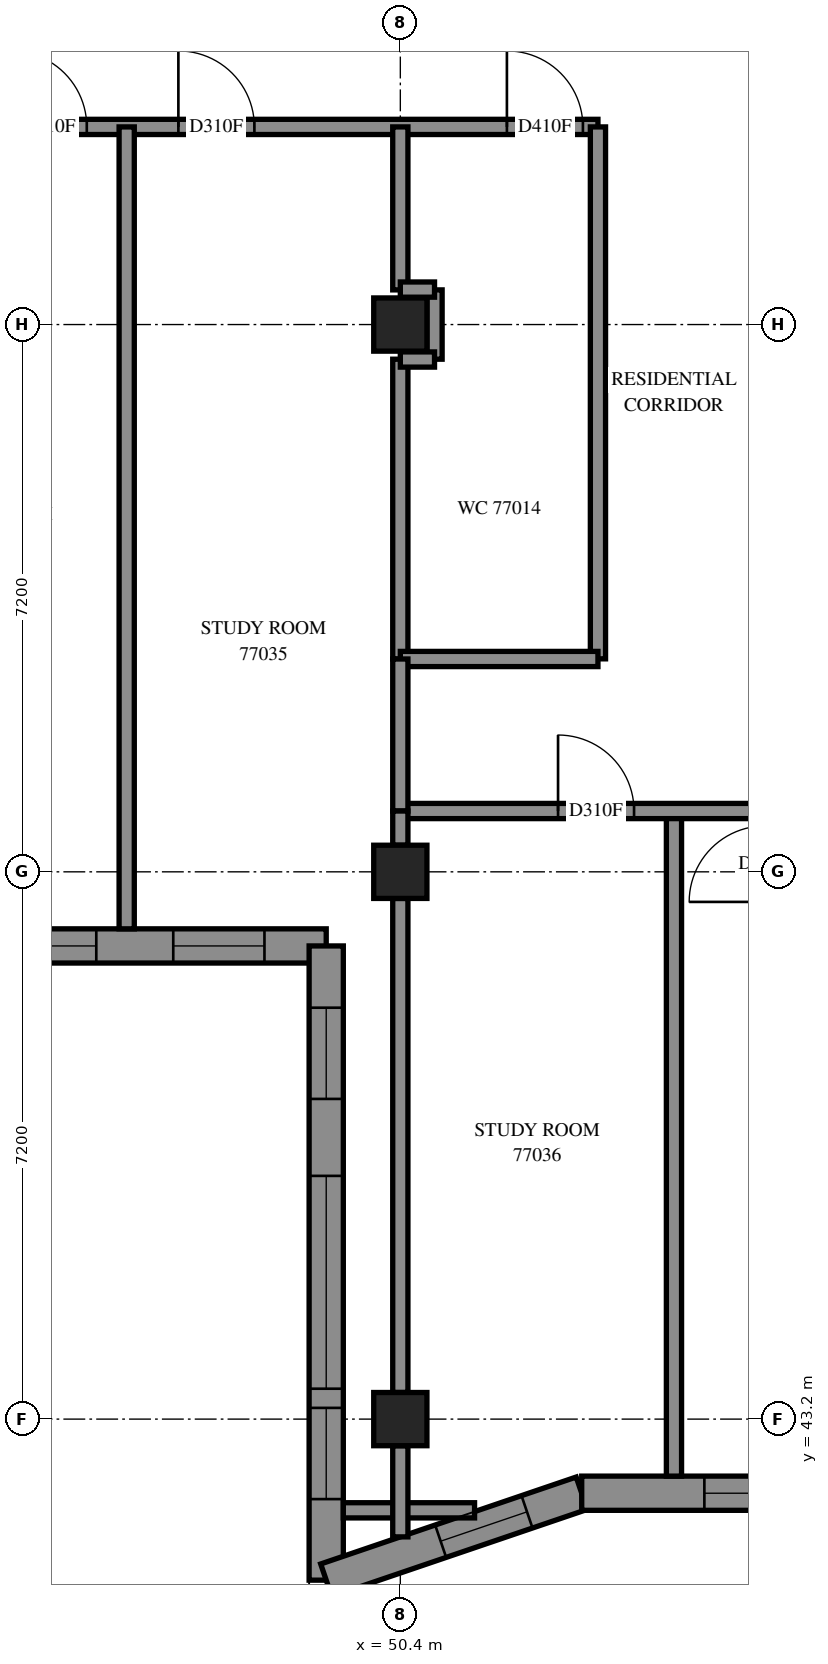
"""IFC4 building model, lengths in metres.
Left out: names, types, materials, properties, quantities, classifications, styles, units other than length and angle.
Written with IfcOpenShell. Run it as: python <this file> out.ifc"""

import sys

from ifc_helpers import new_model, si_unit, direction, frame, frame_2d, origin, origin_2d, place, context, subcontext, project, spatial, polyline, rectangle, outline, extrude, element, fill, save


model = new_model("IFC4")
c1 = context("Model", 3, precision=1e-05, world=origin(), true_north=direction((0.0, 1.0)))
c2 = subcontext(c1, "Body", "Model", "MODEL_VIEW")
j1 = project(units=[si_unit("LENGTHUNIT", "METRE"), si_unit("PLANEANGLEUNIT", "RADIAN")], contexts=[c1])
p1 = place(None, origin())
s1 = spatial("IfcSite", under=j1, at=p1, CompositionType="ELEMENT")
p2 = place(p1, origin())
s2 = spatial("IfcBuilding", under=s1, at=p2, CompositionType="ELEMENT")
p3 = place(p2, frame((0.0, 0.0, 281.2)))
s3 = spatial("IfcBuildingStorey", under=s2, at=p3, CompositionType="ELEMENT", Elevation=281.2)
for number, where, z_axis, x_axis in (
    (1, (50.4, 43.2, 0.0), (0.0, 0.0, 1.0), (1.0, 0.0, 0.0)),
    (2, (50.4, 50.4, 0.0), (0.0, 0.0, 1.0), (1.0, 0.0, 0.0)),
    (3, (50.4, 57.6, 0.0), (0.0, 0.0, 1.0), (1.0, 0.0, 0.0)),
):
    element("IfcColumn", number, at=place(p3, frame(where, z_axis=z_axis, x_axis=x_axis)), inside=s3, PredefinedType="COLUMN", context=c2, shape_type="SweptSolid", body=[
        extrude(rectangle(XDim=0.7, YDim=0.7, at=origin_2d()), origin(), (0.0, 0.0, 1.0), 3.1),
    ])
p4 = place(p3, frame((42.225, 49.425, 0.0), z_axis=(0.0, 0.0, 1.0), x_axis=(1.0, 0.0, 0.0)))
e4 = element("IfcWall", 4, at=p4, inside=s3, PredefinedType="SOLIDWALL", context=c2, shape_type="SweptSolid", body=[
    extrude(outline(polyline([(-0.225, -0.225), (6.975, -0.225), (7.425, 0.225), (0.225, 0.225), (-0.225, -0.225)])), origin(), (0.0, 0.0, 1.0), 3.1),
])
p5 = place(p4, frame((1.375, 0.0, 0.45)))
e5 = element("IfcOpeningElement", 5, at=p5, cuts=e4, PredefinedType="OPENING", context=c2, shape_type="SweptSolid", body=[
    extrude(rectangle(XDim=2.8, YDim=2.55, at=frame_2d((1.4, 1.275))), frame((0.0, 0.235, 0.0), z_axis=(0.0, -1.0, 0.0), x_axis=(1.0, 0.0, 0.0)), (0.0, 0.0, 1.0), 0.47),
])
p6 = place(p4, frame((5.188, 0.0, 0.45)))
e6 = element("IfcOpeningElement", 6, at=p6, cuts=e4, PredefinedType="OPENING", context=c2, shape_type="SweptSolid", body=[
    extrude(rectangle(XDim=1.2, YDim=2.55, at=frame_2d((0.6, 1.275))), frame((0.0, 0.235, 0.0), z_axis=(0.0, -1.0, 0.0), x_axis=(1.0, 0.0, 0.0)), (0.0, 0.0, 1.0), 0.47),
])
p7 = place(p3, frame((49.425, 49.425, 0.0), z_axis=(0.0, 0.0, 1.0), x_axis=(0.0, -1.0, 0.0)))
e7 = element("IfcWall", 7, at=p7, inside=s3, PredefinedType="SOLIDWALL", context=c2, shape_type="SweptSolid", body=[
    extrude(outline(polyline([(0.225, -0.225), (8.658, -0.225), (8.03, 0.225), (-0.225, 0.225), (0.225, -0.225)])), origin(), (0.0, 0.0, 1.0), 3.1),
])
p8 = place(p7, frame((3.025, 0.0, 0.45)))
e8 = element("IfcOpeningElement", 8, at=p8, cuts=e7, PredefinedType="OPENING", context=c2, shape_type="SweptSolid", body=[
    extrude(rectangle(XDim=2.8, YDim=2.55, at=frame_2d((1.4, 1.275))), frame((0.0, 0.235, 0.0), z_axis=(0.0, -1.0, 0.0), x_axis=(1.0, 0.0, 0.0)), (0.0, 0.0, 1.0), 0.47),
])
p9 = place(p7, frame((0.812, 0.0, 0.45)))
e9 = element("IfcOpeningElement", 9, at=p9, cuts=e7, PredefinedType="OPENING", context=c2, shape_type="SweptSolid", body=[
    extrude(rectangle(XDim=1.2, YDim=2.55, at=frame_2d((0.6, 1.275))), frame((0.0, 0.235, 0.0), z_axis=(0.0, -1.0, 0.0), x_axis=(1.0, 0.0, 0.0)), (0.0, 0.0, 1.0), 0.47),
])
p10 = place(p7, frame((6.077, 0.0, 0.45)))
e10 = element("IfcOpeningElement", 10, at=p10, cuts=e7, PredefinedType="OPENING", context=c2, shape_type="SweptSolid", body=[
    extrude(rectangle(XDim=1.2, YDim=2.55, at=frame_2d((0.6, 1.275))), frame((0.0, 0.235, 0.0), z_axis=(0.0, -1.0, 0.0), x_axis=(1.0, 0.0, 0.0)), (0.0, 0.0, 1.0), 0.47),
])
p11 = place(p3, frame((49.425, 41.081, 0.0), z_axis=(0.0, 0.0, 1.0), x_axis=(0.9466934054, 0.3221359901, 0.0)))
e11 = element("IfcWall", 11, at=p11, inside=s3, PredefinedType="SOLIDWALL", context=c2, shape_type="SweptSolid", body=[
    extrude(outline(polyline([(-0.314, -0.225), (3.513, -0.225), (3.588, 0.225), (0.314, 0.225), (-0.314, -0.225)])), origin(), (0.0, 0.0, 1.0), 3.1),
])
p12 = place(p11, frame((1.59, 0.0, 0.45)))
e12 = element("IfcOpeningElement", 12, at=p12, cuts=e11, PredefinedType="OPENING", context=c2, shape_type="SweptSolid", body=[
    extrude(rectangle(XDim=1.2, YDim=2.55, at=frame_2d((0.6, 1.275))), frame((0.0, 0.235, 0.0), z_axis=(0.0, -1.0, 0.0), x_axis=(1.0, 0.0, 0.0)), (0.0, 0.0, 1.0), 0.47),
])
p13 = place(p3, frame((52.786, 42.225, 0.0), z_axis=(0.0, 0.0, 1.0), x_axis=(1.0, 0.0, 0.0)))
e13 = element("IfcWall", 13, at=p13, inside=s3, PredefinedType="SOLIDWALL", context=c2, shape_type="SweptSolid", body=[
    extrude(outline(polyline([(0.037, -0.225), (7.285, -0.225), (7.285, 0.225), (-0.037, 0.225), (0.037, -0.225)])), origin(), (0.0, 0.0, 1.0), 3.1),
])
p14 = place(p13, frame((1.614, 0.0, 0.45)))
e14 = element("IfcOpeningElement", 14, at=p14, cuts=e13, PredefinedType="OPENING", context=c2, shape_type="SweptSolid", body=[
    extrude(rectangle(XDim=2.8, YDim=2.55, at=frame_2d((1.4, 1.275))), frame((0.0, 0.235, 0.0), z_axis=(0.0, -1.0, 0.0), x_axis=(1.0, 0.0, 0.0)), (0.0, 0.0, 1.0), 0.47),
])
p15 = place(p13, frame((5.349, 0.0, 0.45)))
e15 = element("IfcOpeningElement", 15, at=p15, cuts=e13, PredefinedType="OPENING", context=c2, shape_type="SweptSolid", body=[
    extrude(rectangle(XDim=1.2, YDim=2.55, at=frame_2d((0.6, 1.275))), frame((0.0, 0.235, 0.0), z_axis=(0.0, -1.0, 0.0), x_axis=(1.0, 0.0, 0.0)), (0.0, 0.0, 1.0), 0.47),
])
p16 = place(p3, frame((36.0, 60.2, 0.0), z_axis=(0.0, 0.0, 1.0), x_axis=(1.0, 0.0, 0.0)))
e16 = element("IfcWall", 16, at=p16, inside=s3, PredefinedType="PARTITIONING", context=c2, shape_type="SweptSolid", body=[
    extrude(rectangle(XDim=17.0, YDim=0.2, at=frame_2d((8.5, 0.0))), origin(), (0.0, 0.0, 1.0), 3.1),
])
p17 = place(p16, frame((15.802, 0.0, 0.0)))
e17 = element("IfcOpeningElement", 17, at=p17, cuts=e16, PredefinedType="OPENING", context=c2, shape_type="SweptSolid", body=[
    extrude(rectangle(XDim=1.0, YDim=2.1, at=frame_2d((0.5, 1.05))), frame((0.0, 0.11, 0.0), z_axis=(0.0, -1.0, 0.0), x_axis=(1.0, 0.0, 0.0)), (0.0, 0.0, 1.0), 0.22),
])
p18 = place(p16, frame((2.075, 0.0, 0.0)))
e18 = element("IfcOpeningElement", 18, at=p18, cuts=e16, PredefinedType="OPENING", context=c2, shape_type="SweptSolid", body=[
    extrude(rectangle(XDim=1.0, YDim=2.1, at=frame_2d((0.5, 1.05))), frame((0.0, 0.11, 0.0), z_axis=(0.0, -1.0, 0.0), x_axis=(1.0, 0.0, 0.0)), (0.0, 0.0, 1.0), 0.22),
])
p19 = place(p16, frame((4.125, 0.0, 0.0)))
e19 = element("IfcOpeningElement", 19, at=p19, cuts=e16, PredefinedType="OPENING", context=c2, shape_type="SweptSolid", body=[
    extrude(rectangle(XDim=1.0, YDim=2.1, at=frame_2d((0.5, 1.05))), frame((0.0, 0.11, 0.0), z_axis=(0.0, -1.0, 0.0), x_axis=(1.0, 0.0, 0.0)), (0.0, 0.0, 1.0), 0.22),
])
p20 = place(p16, frame((9.275, 0.0, 0.0)))
e20 = element("IfcOpeningElement", 20, at=p20, cuts=e16, PredefinedType="OPENING", context=c2, shape_type="SweptSolid", body=[
    extrude(rectangle(XDim=1.0, YDim=2.1, at=frame_2d((0.5, 1.05))), frame((0.0, 0.11, 0.0), z_axis=(0.0, -1.0, 0.0), x_axis=(1.0, 0.0, 0.0)), (0.0, 0.0, 1.0), 0.22),
])
p21 = place(p16, frame((11.48, 0.0, 0.0)))
e21 = element("IfcOpeningElement", 21, at=p21, cuts=e16, PredefinedType="OPENING", context=c2, shape_type="SweptSolid", body=[
    extrude(rectangle(XDim=1.0, YDim=2.1, at=frame_2d((0.5, 1.05))), frame((0.0, 0.11, 0.0), z_axis=(0.0, -1.0, 0.0), x_axis=(1.0, 0.0, 0.0)), (0.0, 0.0, 1.0), 0.22),
])
p22 = place(p3, frame((46.8, 49.65, 0.0), z_axis=(0.0, 0.0, 1.0), x_axis=(0.0, 1.0, 0.0)))
e22 = element("IfcWall", 22, at=p22, inside=s3, PredefinedType="PARTITIONING", context=c2, shape_type="SweptSolid", body=[
    extrude(rectangle(XDim=10.55, YDim=0.2, at=frame_2d((5.275, 0.0))), origin(), (0.0, 0.0, 1.0), 3.1),
])
p23 = place(p3, frame((54.0, 42.45, 0.0), z_axis=(0.0, 0.0, 1.0), x_axis=(0.0, 1.0, 0.0)))
e23 = element("IfcWall", 23, at=p23, inside=s3, PredefinedType="PARTITIONING", context=c2, shape_type="SweptSolid", body=[
    extrude(rectangle(XDim=8.75, YDim=0.2, at=frame_2d((4.375, 0.0))), origin(), (0.0, 0.0, 1.0), 3.1),
])
p24 = place(p3, frame((53.0, 53.202, 0.0), z_axis=(0.0, 0.0, 1.0), x_axis=(0.0, 1.0, 0.0)))
e24 = element("IfcWall", 24, at=p24, inside=s3, PredefinedType="PARTITIONING", context=c2, shape_type="SweptSolid", body=[
    extrude(rectangle(XDim=6.998, YDim=0.2, at=frame_2d((3.499, 0.0))), origin(), (0.0, 0.0, 1.0), 3.1),
])
p25 = place(p3, frame((50.4, 43.55, 0.0), z_axis=(0.0, 0.0, 1.0), x_axis=(0.0, 1.0, 0.0)))
e25 = element("IfcWall", 25, at=p25, inside=s3, PredefinedType="PARTITIONING", context=c2, shape_type="SweptSolid", body=[
    extrude(rectangle(XDim=6.5, YDim=0.2, at=frame_2d((3.25, 0.0))), origin(), (0.0, 0.0, 1.0), 2.6),
])
p26 = place(p3, frame((50.4, 51.2, 0.0), z_axis=(0.0, 0.0, 1.0), x_axis=(1.0, 0.0, 0.0)))
e26 = element("IfcWall", 26, at=p26, inside=s3, PredefinedType="PARTITIONING", context=c2, shape_type="SweptSolid", body=[
    extrude(rectangle(XDim=4.8, YDim=0.2, at=frame_2d((2.4, 0.0))), origin(), (0.0, 0.0, 1.0), 3.1),
])
p27 = place(p26, frame((2.075, 0.0, 0.0)))
e27 = element("IfcOpeningElement", 27, at=p27, cuts=e26, PredefinedType="OPENING", context=c2, shape_type="SweptSolid", body=[
    extrude(rectangle(XDim=1.0, YDim=2.1, at=frame_2d((0.5, 1.05))), frame((0.0, 0.11, 0.0), z_axis=(0.0, -1.0, 0.0), x_axis=(1.0, 0.0, 0.0)), (0.0, 0.0, 1.0), 0.22),
])
p28 = place(p3, frame((50.4, 53.2, 0.0), z_axis=(0.0, 0.0, 1.0), x_axis=(0.0, 1.0, 0.0)))
e28 = element("IfcWall", 28, at=p28, inside=s3, PredefinedType="PARTITIONING", context=c2, shape_type="SweptSolid", body=[
    extrude(rectangle(XDim=3.944, YDim=0.2, at=frame_2d((1.972, 0.0))), origin(), (0.0, 0.0, 1.0), 3.1),
])
p29 = place(p3, frame((50.4, 53.2, 0.0), z_axis=(0.0, 0.0, 1.0), x_axis=(1.0, 0.0, 0.0)))
e29 = element("IfcWall", 29, at=p29, inside=s3, PredefinedType="PARTITIONING", context=c2, shape_type="SweptSolid", body=[
    extrude(rectangle(XDim=2.6, YDim=0.2, at=frame_2d((1.3, 0.0))), origin(), (0.0, 0.0, 1.0), 3.1),
])
p30 = place(p3, frame((50.4, 58.056, 0.0), z_axis=(0.0, 0.0, 1.0), x_axis=(0.0, 1.0, 0.0)))
e30 = element("IfcWall", 30, at=p30, inside=s3, PredefinedType="PARTITIONING", context=c2, shape_type="SweptSolid", body=[
    extrude(rectangle(XDim=2.144, YDim=0.2, at=frame_2d((1.072, 0.0))), origin(), (0.0, 0.0, 1.0), 3.1),
])
p31 = place(p3, frame((50.4, 51.2, 0.0), z_axis=(0.0, 0.0, 1.0), x_axis=(0.0, 1.0, 0.0)))
e31 = element("IfcWall", 31, at=p31, inside=s3, PredefinedType="PARTITIONING", context=c2, shape_type="SweptSolid", body=[
    extrude(rectangle(XDim=2.0, YDim=0.2, at=frame_2d((1.0, 0.0))), origin(), (0.0, 0.0, 1.0), 3.1),
])
p32 = place(p3, frame((49.65, 42.0, 0.0), z_axis=(0.0, 0.0, 1.0), x_axis=(1.0, 0.0, 0.0)))
e32 = element("IfcWall", 32, at=p32, inside=s3, PredefinedType="PARTITIONING", context=c2, shape_type="SweptSolid", body=[
    extrude(rectangle(XDim=1.727, YDim=0.2, at=frame_2d((0.863, 0.0))), origin(), (0.0, 0.0, 1.0), 3.1),
])
p33 = place(p3, frame((50.85, 57.144, 0.0), z_axis=(0.0, 0.0, 1.0), x_axis=(0.0, 1.0, 0.0)))
e33 = element("IfcWall", 33, at=p33, inside=s3, PredefinedType="PARTITIONING", context=c2, shape_type="SweptSolid", body=[
    extrude(rectangle(XDim=0.912, YDim=0.2, at=frame_2d((0.456, 0.0))), origin(), (0.0, 0.0, 1.0), 3.1),
])
p34 = place(p3, frame((50.4, 41.651, 0.0), z_axis=(0.0, 0.0, 1.0), x_axis=(0.0, 1.0, 0.0)))
e34 = element("IfcWall", 34, at=p34, inside=s3, PredefinedType="PARTITIONING", context=c2, shape_type="SweptSolid", body=[
    extrude(rectangle(XDim=1.199, YDim=0.2, at=frame_2d((0.6, 0.0))), origin(), (0.0, 0.0, 1.0), 3.1),
])
for number, where, z_axis, x_axis in (
    (35, (50.4, 50.75, 0.0), (0.0, 0.0, 1.0), (0.0, 1.0, 0.0)),
    (36, (50.4, 57.14, 0.0), (0.0, 0.0, 1.0), (1.0, 0.0, 0.0)),
    (37, (50.4, 58.06, 0.0), (0.0, 0.0, 1.0), (1.0, 0.0, 0.0)),
):
    element("IfcWall", number, at=place(p3, frame(where, z_axis=z_axis, x_axis=x_axis)), inside=s3, PredefinedType="PARTITIONING", context=c2, shape_type="SweptSolid", body=[
        extrude(rectangle(XDim=0.45, YDim=0.2, at=frame_2d((0.225, 0.0))), origin(), (0.0, 0.0, 1.0), 3.1),
    ])
p35 = place(p5, origin())
e38 = element("IfcWindow", 38, at=p35, inside=s3, PartitioningType="SINGLE_PANEL", PredefinedType="WINDOW", context=c2, shape_type="SweptSolid", body=[
    extrude(rectangle(XDim=2.8, YDim=2.55, at=frame_2d((1.4, 1.275))), frame((0.0, 0.205, 0.0), z_axis=(0.0, -1.0, 0.0), x_axis=(1.0, 0.0, 0.0)), (0.0, 0.0, 1.0), 0.06),
])
fill(e5, e38)
p36 = place(p6, origin())
e39 = element("IfcWindow", 39, at=p36, inside=s3, PartitioningType="SINGLE_PANEL", PredefinedType="WINDOW", context=c2, shape_type="SweptSolid", body=[
    extrude(rectangle(XDim=1.2, YDim=2.55, at=frame_2d((0.6, 1.275))), frame((0.0, 0.205, 0.0), z_axis=(0.0, -1.0, 0.0), x_axis=(1.0, 0.0, 0.0)), (0.0, 0.0, 1.0), 0.06),
])
fill(e6, e39)
p37 = place(p8, origin())
e40 = element("IfcWindow", 40, at=p37, inside=s3, PartitioningType="SINGLE_PANEL", PredefinedType="WINDOW", context=c2, shape_type="SweptSolid", body=[
    extrude(rectangle(XDim=2.8, YDim=2.55, at=frame_2d((1.4, 1.275))), frame((0.0, 0.205, 0.0), z_axis=(0.0, -1.0, 0.0), x_axis=(1.0, 0.0, 0.0)), (0.0, 0.0, 1.0), 0.06),
])
fill(e8, e40)
p38 = place(p9, origin())
e41 = element("IfcWindow", 41, at=p38, inside=s3, PartitioningType="SINGLE_PANEL", PredefinedType="WINDOW", context=c2, shape_type="SweptSolid", body=[
    extrude(rectangle(XDim=1.2, YDim=2.55, at=frame_2d((0.6, 1.275))), frame((0.0, 0.205, 0.0), z_axis=(0.0, -1.0, 0.0), x_axis=(1.0, 0.0, 0.0)), (0.0, 0.0, 1.0), 0.06),
])
fill(e9, e41)
p39 = place(p10, origin())
e42 = element("IfcWindow", 42, at=p39, inside=s3, PartitioningType="SINGLE_PANEL", PredefinedType="WINDOW", context=c2, shape_type="SweptSolid", body=[
    extrude(rectangle(XDim=1.2, YDim=2.55, at=frame_2d((0.6, 1.275))), frame((0.0, 0.205, 0.0), z_axis=(0.0, -1.0, 0.0), x_axis=(1.0, 0.0, 0.0)), (0.0, 0.0, 1.0), 0.06),
])
fill(e10, e42)
p40 = place(p12, origin())
e43 = element("IfcWindow", 43, at=p40, inside=s3, PartitioningType="SINGLE_PANEL", PredefinedType="WINDOW", context=c2, shape_type="SweptSolid", body=[
    extrude(rectangle(XDim=1.2, YDim=2.55, at=frame_2d((0.6, 1.275))), frame((0.0, 0.115, 0.0), z_axis=(0.0, -1.0, 0.0), x_axis=(1.0, 0.0, 0.0)), (0.0, 0.0, 1.0), 0.06),
])
fill(e12, e43)
p41 = place(p14, origin())
e44 = element("IfcWindow", 44, at=p41, inside=s3, PartitioningType="SINGLE_PANEL", PredefinedType="WINDOW", context=c2, shape_type="SweptSolid", body=[
    extrude(rectangle(XDim=2.8, YDim=2.55, at=frame_2d((1.4, 1.275))), frame((0.0, 0.205, 0.0), z_axis=(0.0, -1.0, 0.0), x_axis=(1.0, 0.0, 0.0)), (0.0, 0.0, 1.0), 0.06),
])
fill(e14, e44)
p42 = place(p17, origin())
e45 = element("IfcDoor", 45, at=p42, inside=s3, OperationType="SINGLE_SWING_LEFT", PredefinedType="DOOR", context=c2, shape_type="SweptSolid", body=[
    extrude(rectangle(XDim=1.0, YDim=2.1, at=frame_2d((0.5, 1.05))), frame((0.0, 0.025, 0.0), z_axis=(0.0, -1.0, 0.0), x_axis=(1.0, 0.0, 0.0)), (0.0, 0.0, 1.0), 0.05),
])
fill(e17, e45)
p43 = place(p20, origin())
e46 = element("IfcDoor", 46, at=p43, inside=s3, OperationType="SINGLE_SWING_LEFT", PredefinedType="DOOR", context=c2, shape_type="SweptSolid", body=[
    extrude(rectangle(XDim=1.0, YDim=2.1, at=frame_2d((0.5, 1.05))), frame((0.0, 0.025, 0.0), z_axis=(0.0, -1.0, 0.0), x_axis=(1.0, 0.0, 0.0)), (0.0, 0.0, 1.0), 0.05),
])
fill(e20, e46)
p44 = place(p21, origin())
e47 = element("IfcDoor", 47, at=p44, inside=s3, OperationType="SINGLE_SWING_RIGHT", PredefinedType="DOOR", context=c2, shape_type="SweptSolid", body=[
    extrude(rectangle(XDim=1.0, YDim=2.1, at=frame_2d((0.5, 1.05))), frame((0.0, 0.025, 0.0), z_axis=(0.0, -1.0, 0.0), x_axis=(1.0, 0.0, 0.0)), (0.0, 0.0, 1.0), 0.05),
])
fill(e21, e47)
p45 = place(p27, origin())
e48 = element("IfcDoor", 48, at=p45, inside=s3, OperationType="SINGLE_SWING_LEFT", PredefinedType="DOOR", context=c2, shape_type="SweptSolid", body=[
    extrude(rectangle(XDim=1.0, YDim=2.1, at=frame_2d((0.5, 1.05))), frame((0.0, 0.025, 0.0), z_axis=(0.0, -1.0, 0.0), x_axis=(1.0, 0.0, 0.0)), (0.0, 0.0, 1.0), 0.05),
])
fill(e27, e48)
save(model, sys.argv[1])
